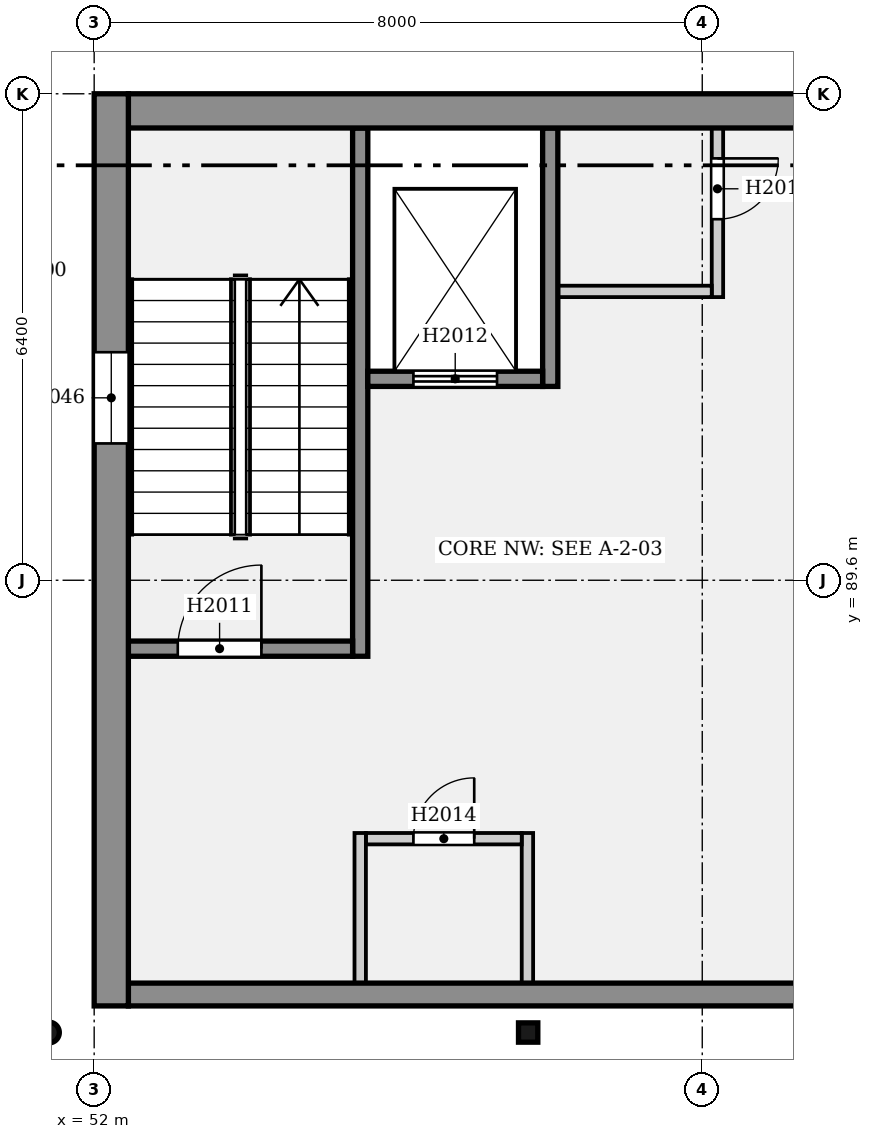
"""IFC4 building model, lengths in metres.
Left out: names, types, materials, properties, quantities, classifications, styles, units other than length and angle.
Written with IfcOpenShell. Run it as: python <this file> out.ifc"""

import sys

from ifc_helpers import new_model, si_unit, direction, frame, frame_2d, origin, origin_2d, place, context, subcontext, project, spatial, rectangle, hollow_rectangle, hollow_circle, extrude, element, fill, save


model = new_model("IFC4")
c1 = context("Model", 3, precision=1e-05, world=origin(), true_north=direction((0.0, 1.0)))
c2 = subcontext(c1, "Body", "Model", "MODEL_VIEW")
j1 = project(units=[si_unit("LENGTHUNIT", "METRE"), si_unit("PLANEANGLEUNIT", "RADIAN")], contexts=[c1])
p1 = place(None, origin())
s1 = spatial("IfcSite", under=j1, at=p1, CompositionType="ELEMENT")
p2 = place(p1, origin())
s2 = spatial("IfcBuilding", under=s1, at=p2, CompositionType="ELEMENT")
p3 = place(p2, frame((0.0, 0.0, 9.4)))
s3 = spatial("IfcBuildingStorey", under=s2, at=p3, CompositionType="ELEMENT", Elevation=9.4)
p4 = place(p3, frame((52.225, 96.0, 0.0), z_axis=(0.0, 0.0, 1.0), x_axis=(0.0, -1.0, 0.0)))
e1 = element("IfcWall", 1, at=p4, inside=s3, PredefinedType="ELEMENTEDWALL", context=c2, shape_type="SweptSolid", body=[
    extrude(rectangle(XDim=12.0, YDim=0.45, at=frame_2d((6.0, 0.0))), origin(), (0.0, 0.0, 1.0), 4.4),
])
p5 = place(p4, frame((3.4, 0.0, 0.6)))
e2 = element("IfcOpeningElement", 2, at=p5, cuts=e1, PredefinedType="OPENING", context=c2, shape_type="SweptSolid", body=[
    extrude(rectangle(XDim=1.2, YDim=3.0, at=frame_2d((0.6, 1.5))), frame((0.0, 0.235, 0.0), z_axis=(0.0, -1.0, 0.0), x_axis=(1.0, 0.0, 0.0)), (0.0, 0.0, 1.0), 0.47),
])
p6 = place(p3, frame((52.45, 95.775, 0.0), z_axis=(0.0, 0.0, 1.0), x_axis=(1.0, 0.0, 0.0)))
e3 = element("IfcWall", 3, at=p6, inside=s3, PredefinedType="ELEMENTEDWALL", context=c2, shape_type="SweptSolid", body=[
    extrude(rectangle(XDim=11.55, YDim=0.45, at=frame_2d((5.775, 0.0))), origin(), (0.0, 0.0, 1.0), 4.4),
])
p7 = place(p3, frame((52.45, 84.15, 0.0), z_axis=(0.0, 0.0, 1.0), x_axis=(1.0, 0.0, 0.0)))
e4 = element("IfcWall", 4, at=p7, inside=s3, PredefinedType="SOLIDWALL", context=c2, shape_type="SweptSolid", body=[
    extrude(rectangle(XDim=11.55, YDim=0.3, at=frame_2d((5.775, 0.0))), origin(), (0.0, 0.0, 1.0), 4.4),
])
p8 = place(p3, frame((51.405, 83.65, 0.0), z_axis=(-0.19937762145, 0.0, 0.979922733722), x_axis=(0.0, -1.0, 0.0)))
e5 = element("IfcColumn", 5, at=p8, inside=s3, PredefinedType="COLUMN", context=c2, shape_type="SweptSolid", body=[
    extrude(hollow_circle(Radius=0.136, WallThickness=0.013, at=origin_2d()), origin(), (0.0, 0.0, 1.0), 3.54),
])
p9 = place(p3, frame((57.71, 83.65, 0.0), z_axis=(0.0, 0.0, 1.0), x_axis=(1.0, 0.0, 0.0)))
e6 = element("IfcColumn", 6, at=p9, inside=s3, PredefinedType="COLUMN", context=c2, shape_type="SweptSolid", body=[
    extrude(hollow_rectangle(XDim=0.254, YDim=0.254, WallThickness=0.016, InnerFilletRadius=0.008, OuterFilletRadius=0.024, at=origin_2d()), origin(), (0.0, 0.0, 1.0), 3.496),
])
p10 = place(p3, frame((55.5, 95.55, 0.0), z_axis=(0.0, 0.0, 1.0), x_axis=(0.0, -1.0, 0.0)))
e7 = element("IfcWall", 7, at=p10, inside=s3, PredefinedType="SOLIDWALL", context=c2, shape_type="SweptSolid", body=[
    extrude(rectangle(XDim=6.95, YDim=0.2, at=frame_2d((3.475, 0.0))), origin(), (0.0, 0.0, 1.0), 4.4),
])
p11 = place(p3, frame((52.45, 88.7, 0.0), z_axis=(0.0, 0.0, 1.0), x_axis=(1.0, 0.0, 0.0)))
e8 = element("IfcWall", 8, at=p11, inside=s3, PredefinedType="SOLIDWALL", context=c2, shape_type="SweptSolid", body=[
    extrude(rectangle(XDim=2.95, YDim=0.2, at=frame_2d((1.475, 0.0))), origin(), (0.0, 0.0, 1.0), 4.4),
])
p12 = place(p11, frame((0.65, 0.0, 0.0)))
e9 = element("IfcOpeningElement", 9, at=p12, cuts=e8, PredefinedType="OPENING", context=c2, shape_type="SweptSolid", body=[
    extrude(rectangle(XDim=1.1, YDim=2.1, at=frame_2d((0.55, 1.05))), frame((0.0, 0.11, 0.0), z_axis=(0.0, -1.0, 0.0), x_axis=(1.0, 0.0, 0.0)), (0.0, 0.0, 1.0), 0.22),
])
p13 = place(p3, frame((58.0, 95.55, 0.0), z_axis=(0.0, 0.0, 1.0), x_axis=(0.0, -1.0, 0.0)))
e10 = element("IfcWall", 10, at=p13, inside=s3, PredefinedType="SOLIDWALL", context=c2, shape_type="SweptSolid", body=[
    extrude(rectangle(XDim=3.4, YDim=0.2, at=frame_2d((1.7, 0.0))), origin(), (0.0, 0.0, 1.0), 4.4),
])
p14 = place(p3, frame((55.6, 92.25, 0.0), z_axis=(0.0, 0.0, 1.0), x_axis=(1.0, 0.0, 0.0)))
e11 = element("IfcWall", 11, at=p14, inside=s3, PredefinedType="SOLIDWALL", context=c2, shape_type="SweptSolid", body=[
    extrude(rectangle(XDim=2.3, YDim=0.2, at=frame_2d((1.15, 0.0))), origin(), (0.0, 0.0, 1.0), 4.4),
])
p15 = place(p14, frame((0.6, 0.0, 0.0)))
e12 = element("IfcOpeningElement", 12, at=p15, cuts=e11, PredefinedType="OPENING", context=c2, shape_type="SweptSolid", body=[
    extrude(rectangle(XDim=1.1, YDim=2.1, at=frame_2d((0.55, 1.05))), frame((0.0, 0.11, 0.0), z_axis=(0.0, -1.0, 0.0), x_axis=(1.0, 0.0, 0.0)), (0.0, 0.0, 1.0), 0.22),
])
p16 = place(p3, frame((58.1, 93.4, 0.0), z_axis=(0.0, 0.0, 1.0), x_axis=(1.0, 0.0, 0.0)))
e13 = element("IfcWall", 13, at=p16, inside=s3, PredefinedType="PARTITIONING", context=c2, shape_type="SweptSolid", body=[
    extrude(rectangle(XDim=2.025, YDim=0.15, at=frame_2d((1.012, 0.0))), origin(), (0.0, 0.0, 1.0), 4.15),
])
p17 = place(p3, frame((60.2, 95.55, 0.0), z_axis=(0.0, 0.0, 1.0), x_axis=(0.0, -1.0, 0.0)))
e14 = element("IfcWall", 14, at=p17, inside=s3, PredefinedType="PARTITIONING", context=c2, shape_type="SweptSolid", body=[
    extrude(rectangle(XDim=2.225, YDim=0.15, at=frame_2d((1.113, 0.0))), origin(), (0.0, 0.0, 1.0), 4.15),
])
p18 = place(p17, frame((0.4, 0.0, 0.0)))
e15 = element("IfcOpeningElement", 15, at=p18, cuts=e14, PredefinedType="OPENING", context=c2, shape_type="SweptSolid", body=[
    extrude(rectangle(XDim=0.8, YDim=2.1, at=frame_2d((0.4, 1.05))), frame((0.0, 0.085, 0.0), z_axis=(0.0, -1.0, 0.0), x_axis=(1.0, 0.0, 0.0)), (0.0, 0.0, 1.0), 0.17),
])
p19 = place(p3, frame((55.575, 86.2, 0.0), z_axis=(0.0, 0.0, 1.0), x_axis=(1.0, 0.0, 0.0)))
e16 = element("IfcWall", 16, at=p19, inside=s3, PredefinedType="PARTITIONING", context=c2, shape_type="SweptSolid", body=[
    extrude(rectangle(XDim=2.05, YDim=0.15, at=frame_2d((1.025, 0.0))), origin(), (0.0, 0.0, 1.0), 4.15),
])
p20 = place(p19, frame((0.625, 0.0, 0.0)))
e17 = element("IfcOpeningElement", 17, at=p20, cuts=e16, PredefinedType="OPENING", context=c2, shape_type="SweptSolid", body=[
    extrude(rectangle(XDim=0.8, YDim=2.1, at=frame_2d((0.4, 1.05))), frame((0.0, 0.085, 0.0), z_axis=(0.0, -1.0, 0.0), x_axis=(1.0, 0.0, 0.0)), (0.0, 0.0, 1.0), 0.17),
])
for number, where, z_axis, x_axis in (
    (18, (55.5, 86.275, 0.0), (0.0, 0.0, 1.0), (0.0, -1.0, 0.0)),
    (19, (57.7, 86.275, 0.0), (0.0, 0.0, 1.0), (0.0, -1.0, 0.0)),
):
    element("IfcWall", number, at=place(p3, frame(where, z_axis=z_axis, x_axis=x_axis)), inside=s3, PredefinedType="PARTITIONING", context=c2, shape_type="SweptSolid", body=[
        extrude(rectangle(XDim=1.975, YDim=0.15, at=frame_2d((0.987, 0.0))), origin(), (0.0, 0.0, 1.0), 4.15),
    ])
p21 = place(p12, origin())
e20 = element("IfcDoor", 20, at=p21, inside=s3, OperationType="SINGLE_SWING_RIGHT", PredefinedType="DOOR", context=c2, shape_type="SweptSolid", body=[
    extrude(rectangle(XDim=1.1, YDim=2.1, at=frame_2d((0.55, 1.05))), frame((0.0, 0.025, 0.0), z_axis=(0.0, -1.0, 0.0), x_axis=(1.0, 0.0, 0.0)), (0.0, 0.0, 1.0), 0.05),
])
fill(e9, e20)
p22 = place(p15, origin())
e21 = element("IfcDoor", 21, at=p22, inside=s3, OperationType="DOUBLE_DOOR_SLIDING", PredefinedType="DOOR", context=c2, shape_type="SweptSolid", body=[
    extrude(rectangle(XDim=1.1, YDim=2.1, at=frame_2d((0.55, 1.05))), frame((0.0, 0.025, 0.0), z_axis=(0.0, -1.0, 0.0), x_axis=(1.0, 0.0, 0.0)), (0.0, 0.0, 1.0), 0.05),
])
fill(e12, e21)
p23 = place(p18, origin())
e22 = element("IfcDoor", 22, at=p23, inside=s3, OperationType="SINGLE_SWING_LEFT", PredefinedType="DOOR", context=c2, shape_type="SweptSolid", body=[
    extrude(rectangle(XDim=0.8, YDim=2.1, at=frame_2d((0.4, 1.05))), frame((0.0, 0.025, 0.0), z_axis=(0.0, -1.0, 0.0), x_axis=(1.0, 0.0, 0.0)), (0.0, 0.0, 1.0), 0.05),
])
fill(e15, e22)
p24 = place(p20, origin())
e23 = element("IfcDoor", 23, at=p24, inside=s3, OperationType="SINGLE_SWING_RIGHT", PredefinedType="DOOR", context=c2, shape_type="SweptSolid", body=[
    extrude(rectangle(XDim=0.8, YDim=2.1, at=frame_2d((0.4, 1.05))), frame((0.0, 0.025, 0.0), z_axis=(0.0, -1.0, 0.0), x_axis=(1.0, 0.0, 0.0)), (0.0, 0.0, 1.0), 0.05),
])
fill(e17, e23)
p25 = place(p5, origin())
e24 = element("IfcWindow", 24, at=p25, inside=s3, PartitioningType="SINGLE_PANEL", PredefinedType="WINDOW", context=c2, shape_type="SweptSolid", body=[
    extrude(rectangle(XDim=1.2, YDim=3.0, at=frame_2d((0.6, 1.5))), frame((0.0, 0.03, 0.0), z_axis=(0.0, -1.0, 0.0), x_axis=(1.0, 0.0, 0.0)), (0.0, 0.0, 1.0), 0.06),
])
fill(e2, e24)
save(model, sys.argv[1])
